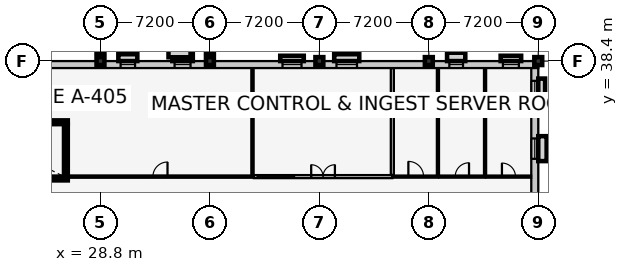
"""IFC4 building model, lengths in metres.
Left out: names, types, materials, properties, quantities, classifications, styles, units other than length and angle.
Written with IfcOpenShell. Run it as: python <this file> out.ifc"""

import sys

from ifc_helpers import new_model, si_unit, direction, frame, frame_2d, origin, origin_2d, place, context, subcontext, project, spatial, rectangle, extrude, element, fill, save


model = new_model("IFC4")
c1 = context("Model", 3, precision=1e-05, world=origin(), true_north=direction((0.0, 1.0)))
c2 = subcontext(c1, "Body", "Model", "MODEL_VIEW")
j1 = project(units=[si_unit("LENGTHUNIT", "METRE"), si_unit("PLANEANGLEUNIT", "RADIAN")], contexts=[c1])
p1 = place(None, origin())
s1 = spatial("IfcSite", under=j1, at=p1, CompositionType="ELEMENT")
p2 = place(p1, origin())
s2 = spatial("IfcBuilding", under=s1, at=p2, CompositionType="ELEMENT")
p3 = place(p2, frame((0.0, 0.0, 5.4)))
s3 = spatial("IfcBuildingStorey", under=s2, at=p3, CompositionType="ELEMENT", Elevation=5.4)
for number, where, z_axis, x_axis in (
    (1, (28.8, 38.4, 0.0), (0.0, 0.0, 1.0), (1.0, 0.0, 0.0)),
    (2, (36.0, 38.4, 0.0), (0.0, 0.0, 1.0), (1.0, 0.0, 0.0)),
    (3, (43.2, 38.4, 0.0), (0.0, 0.0, 1.0), (1.0, 0.0, 0.0)),
    (4, (50.4, 38.4, 0.0), (0.0, 0.0, 1.0), (1.0, 0.0, 0.0)),
    (5, (57.6, 38.4, 0.0), (0.0, 0.0, 1.0), (1.0, 0.0, 0.0)),
    (6, (28.8, 39.2, 0.0), (0.0, 0.0, 1.0), (1.0, 0.0, 0.0)),
    (7, (36.0, 39.2, 0.0), (0.0, 0.0, 1.0), (1.0, 0.0, 0.0)),
):
    element("IfcColumn", number, at=place(p3, frame(where, z_axis=z_axis, x_axis=x_axis)), inside=s3, PredefinedType="COLUMN", context=c2, shape_type="SweptSolid", body=[
        extrude(rectangle(XDim=0.52, YDim=0.52, at=origin_2d()), origin(), (0.0, 0.0, 1.0), 4.2),
    ])
p4 = place(p3, frame((57.37, 38.4, 0.0), z_axis=(0.0, 0.0, 1.0), x_axis=(0.0, -1.0, 0.0)))
e8 = element("IfcWall", 8, at=p4, inside=s3, PredefinedType="SOLIDWALL", context=c2, shape_type="SweptSolid", body=[
    extrude(rectangle(XDim=38.4, YDim=0.46, at=frame_2d((19.2, 0.0))), origin(), (0.0, 0.0, 1.0), 3.075),
])
p5 = place(p4, frame((1.3, 0.0, 0.9)))
e9 = element("IfcOpeningElement", 9, at=p5, cuts=e8, PredefinedType="OPENING", context=c2, shape_type="SweptSolid", body=[
    extrude(rectangle(XDim=1.24, YDim=1.75, at=frame_2d((0.62, 0.875))), frame((0.0, 0.242, 0.0), z_axis=(0.0, -1.0, 0.0), x_axis=(1.0, 0.0, 0.0)), (0.0, 0.0, 1.0), 0.484),
])
p6 = place(p4, frame((5.09, 0.0, 0.9)))
e10 = element("IfcOpeningElement", 10, at=p6, cuts=e8, PredefinedType="OPENING", context=c2, shape_type="SweptSolid", body=[
    extrude(rectangle(XDim=1.34, YDim=1.75, at=frame_2d((0.67, 0.875))), frame((0.0, 0.242, 0.0), z_axis=(0.0, -1.0, 0.0), x_axis=(1.0, 0.0, 0.0)), (0.0, 0.0, 1.0), 0.484),
])
p7 = place(p3, frame((0.0, 38.17, 0.0), z_axis=(0.0, 0.0, 1.0), x_axis=(1.0, 0.0, 0.0)))
e11 = element("IfcWall", 11, at=p7, inside=s3, PredefinedType="SOLIDWALL", context=c2, shape_type="SweptSolid", body=[
    extrude(rectangle(XDim=57.6, YDim=0.46, at=frame_2d((28.8, 0.0))), origin(), (0.0, 0.0, 1.0), 3.215),
])
p8 = place(p7, frame((1.08, 0.0, 0.9)))
e12 = element("IfcOpeningElement", 12, at=p8, cuts=e11, PredefinedType="OPENING", context=c2, shape_type="SweptSolid", body=[
    extrude(rectangle(XDim=1.44, YDim=1.75, at=frame_2d((0.72, 0.875))), frame((0.0, 0.242, 0.0), z_axis=(0.0, -1.0, 0.0), x_axis=(1.0, 0.0, 0.0)), (0.0, 0.0, 1.0), 0.484),
])
p9 = place(p7, frame((4.65, 0.0, 0.9)))
e13 = element("IfcOpeningElement", 13, at=p9, cuts=e11, PredefinedType="OPENING", context=c2, shape_type="SweptSolid", body=[
    extrude(rectangle(XDim=1.5, YDim=1.75, at=frame_2d((0.75, 0.875))), frame((0.0, 0.242, 0.0), z_axis=(0.0, -1.0, 0.0), x_axis=(1.0, 0.0, 0.0)), (0.0, 0.0, 1.0), 0.484),
])
p10 = place(p7, frame((8.55, 0.0, 0.9)))
e14 = element("IfcOpeningElement", 14, at=p10, cuts=e11, PredefinedType="OPENING", context=c2, shape_type="SweptSolid", body=[
    extrude(rectangle(XDim=0.9, YDim=1.35, at=frame_2d((0.45, 0.675))), frame((0.0, 0.242, 0.0), z_axis=(0.0, -1.0, 0.0), x_axis=(1.0, 0.0, 0.0)), (0.0, 0.0, 1.0), 0.484),
])
p11 = place(p7, frame((12.1, 0.0, 0.9)))
e15 = element("IfcOpeningElement", 15, at=p11, cuts=e11, PredefinedType="OPENING", context=c2, shape_type="SweptSolid", body=[
    extrude(rectangle(XDim=1.0, YDim=1.35, at=frame_2d((0.5, 0.675))), frame((0.0, 0.242, 0.0), z_axis=(0.0, -1.0, 0.0), x_axis=(1.0, 0.0, 0.0)), (0.0, 0.0, 1.0), 0.484),
])
p12 = place(p7, frame((15.65, 0.0, 0.9)))
e16 = element("IfcOpeningElement", 16, at=p12, cuts=e11, PredefinedType="OPENING", context=c2, shape_type="SweptSolid", body=[
    extrude(rectangle(XDim=1.1, YDim=1.35, at=frame_2d((0.55, 0.675))), frame((0.0, 0.242, 0.0), z_axis=(0.0, -1.0, 0.0), x_axis=(1.0, 0.0, 0.0)), (0.0, 0.0, 1.0), 0.484),
])
p13 = place(p7, frame((19.2, 0.0, 0.9)))
e17 = element("IfcOpeningElement", 17, at=p13, cuts=e11, PredefinedType="OPENING", context=c2, shape_type="SweptSolid", body=[
    extrude(rectangle(XDim=1.2, YDim=1.35, at=frame_2d((0.6, 0.675))), frame((0.0, 0.242, 0.0), z_axis=(0.0, -1.0, 0.0), x_axis=(1.0, 0.0, 0.0)), (0.0, 0.0, 1.0), 0.484),
])
p14 = place(p7, frame((22.75, 0.0, 0.9)))
e18 = element("IfcOpeningElement", 18, at=p14, cuts=e11, PredefinedType="OPENING", context=c2, shape_type="SweptSolid", body=[
    extrude(rectangle(XDim=1.3, YDim=1.35, at=frame_2d((0.65, 0.675))), frame((0.0, 0.242, 0.0), z_axis=(0.0, -1.0, 0.0), x_axis=(1.0, 0.0, 0.0)), (0.0, 0.0, 1.0), 0.484),
])
p15 = place(p7, frame((30.125, 0.0, 0.9)))
e19 = element("IfcOpeningElement", 19, at=p15, cuts=e11, PredefinedType="OPENING", context=c2, shape_type="SweptSolid", body=[
    extrude(rectangle(XDim=0.95, YDim=1.45, at=frame_2d((0.475, 0.725))), frame((0.0, 0.242, 0.0), z_axis=(0.0, -1.0, 0.0), x_axis=(1.0, 0.0, 0.0)), (0.0, 0.0, 1.0), 0.484),
])
p16 = place(p7, frame((33.675, 0.0, 0.9)))
e20 = element("IfcOpeningElement", 20, at=p16, cuts=e11, PredefinedType="OPENING", context=c2, shape_type="SweptSolid", body=[
    extrude(rectangle(XDim=1.05, YDim=1.45, at=frame_2d((0.525, 0.725))), frame((0.0, 0.242, 0.0), z_axis=(0.0, -1.0, 0.0), x_axis=(1.0, 0.0, 0.0)), (0.0, 0.0, 1.0), 0.484),
])
p17 = place(p7, frame((40.775, 0.0, 0.9)))
e21 = element("IfcOpeningElement", 21, at=p17, cuts=e11, PredefinedType="OPENING", context=c2, shape_type="SweptSolid", body=[
    extrude(rectangle(XDim=1.25, YDim=1.45, at=frame_2d((0.625, 0.725))), frame((0.0, 0.242, 0.0), z_axis=(0.0, -1.0, 0.0), x_axis=(1.0, 0.0, 0.0)), (0.0, 0.0, 1.0), 0.484),
])
p18 = place(p7, frame((44.325, 0.0, 0.9)))
e22 = element("IfcOpeningElement", 22, at=p18, cuts=e11, PredefinedType="OPENING", context=c2, shape_type="SweptSolid", body=[
    extrude(rectangle(XDim=1.35, YDim=1.45, at=frame_2d((0.675, 0.725))), frame((0.0, 0.242, 0.0), z_axis=(0.0, -1.0, 0.0), x_axis=(1.0, 0.0, 0.0)), (0.0, 0.0, 1.0), 0.484),
])
p19 = place(p7, frame((51.75, 0.0, 0.9)))
e23 = element("IfcOpeningElement", 23, at=p19, cuts=e11, PredefinedType="OPENING", context=c2, shape_type="SweptSolid", body=[
    extrude(rectangle(XDim=0.9, YDim=1.6, at=frame_2d((0.45, 0.8))), frame((0.0, 0.242, 0.0), z_axis=(0.0, -1.0, 0.0), x_axis=(1.0, 0.0, 0.0)), (0.0, 0.0, 1.0), 0.484),
])
p20 = place(p7, frame((55.275, 0.0, 0.9)))
e24 = element("IfcOpeningElement", 24, at=p20, cuts=e11, PredefinedType="OPENING", context=c2, shape_type="SweptSolid", body=[
    extrude(rectangle(XDim=1.05, YDim=1.6, at=frame_2d((0.525, 0.8))), frame((0.0, 0.242, 0.0), z_axis=(0.0, -1.0, 0.0), x_axis=(1.0, 0.0, 0.0)), (0.0, 0.0, 1.0), 0.484),
])
for number, where, z_axis, x_axis in (
    (25, (17.75, 30.675, 0.0), (0.0, 0.0, 1.0), (1.0, 0.0, 0.0)),
    (26, (26.65, 34.375, 0.0), (0.0, 0.0, 1.0), (-1.0, 0.0, 0.0)),
):
    element("IfcWall", number, at=place(p3, frame(where, z_axis=z_axis, x_axis=x_axis)), inside=s3, PredefinedType="SHEAR", context=c2, shape_type="SweptSolid", body=[
        extrude(rectangle(XDim=8.9, YDim=0.25, at=frame_2d((4.45, 0.0))), origin(), (0.0, 0.0, 1.0), 3.92),
    ])
p21 = place(p3, frame((26.525, 30.8, 0.0), z_axis=(0.0, 0.0, 1.0), x_axis=(0.0, 1.0, 0.0)))
e27 = element("IfcWall", 27, at=p21, inside=s3, PredefinedType="SHEAR", context=c2, shape_type="SweptSolid", body=[
    extrude(rectangle(XDim=3.45, YDim=0.25, at=frame_2d((1.725, 0.0))), origin(), (0.0, 0.0, 1.0), 3.92),
])
p22 = place(p3, frame((26.66, 30.8, 0.0), z_axis=(0.0, 0.0, 1.0), x_axis=(1.0, 0.0, 0.0)))
e28 = element("IfcWall", 28, at=p22, inside=s3, PredefinedType="PARTITIONING", context=c2, shape_type="SweptSolid", body=[
    extrude(rectangle(XDim=12.14, YDim=0.15, at=frame_2d((6.07, 0.0))), origin(), (0.0, 0.0, 1.0), 3.92),
])
p23 = place(p22, frame((5.59, 0.0, 0.0)))
e29 = element("IfcOpeningElement", 29, at=p23, cuts=e28, PredefinedType="OPENING", context=c2, shape_type="SweptSolid", body=[
    extrude(rectangle(XDim=0.96, YDim=2.1, at=frame_2d((0.48, 1.05))), frame((0.0, 0.087, 0.0), z_axis=(0.0, -1.0, 0.0), x_axis=(1.0, 0.0, 0.0)), (0.0, 0.0, 1.0), 0.174),
])
p24 = place(p3, frame((38.8, 30.885, 0.0), z_axis=(0.0, 0.0, 1.0), x_axis=(0.0, 1.0, 0.0)))
e30 = element("IfcWall", 30, at=p24, inside=s3, PredefinedType="PARTITIONING", context=c2, shape_type="SweptSolid", body=[
    extrude(rectangle(XDim=7.045, YDim=0.15, at=frame_2d((3.522, 0.0))), origin(), (0.0, 0.0, 1.0), 3.92),
])
p25 = place(p3, frame((38.885, 30.8, 0.0), z_axis=(0.0, 0.0, 1.0), x_axis=(1.0, 0.0, 0.0)))
e31 = element("IfcWall", 31, at=p25, inside=s3, PredefinedType="PARTITIONING", context=c2, shape_type="SweptSolid", body=[
    extrude(rectangle(XDim=9.115, YDim=0.2, at=frame_2d((4.558, 0.0))), origin(), (0.0, 0.0, 1.0), 3.92),
])
p26 = place(p25, frame((3.778, 0.0, 0.0)))
e32 = element("IfcOpeningElement", 32, at=p26, cuts=e31, PredefinedType="OPENING", context=c2, shape_type="SweptSolid", body=[
    extrude(rectangle(XDim=1.56, YDim=2.25, at=frame_2d((0.78, 1.125))), frame((0.0, 0.112, 0.0), z_axis=(0.0, -1.0, 0.0), x_axis=(1.0, 0.0, 0.0)), (0.0, 0.0, 1.0), 0.224),
])
p27 = place(p25, frame((0.25, 0.0, 1.0)))
e33 = element("IfcOpeningElement", 33, at=p27, cuts=e31, PredefinedType="OPENING", context=c2, shape_type="SweptSolid", body=[
    extrude(rectangle(XDim=2.4, YDim=1.25, at=frame_2d((1.2, 0.625))), frame((0.0, 0.112, 0.0), z_axis=(0.0, -1.0, 0.0), x_axis=(1.0, 0.0, 0.0)), (0.0, 0.0, 1.0), 0.224),
])
p28 = place(p3, frame((48.0, 30.91, 0.0), z_axis=(0.0, 0.0, 1.0), x_axis=(0.0, 1.0, 0.0)))
e34 = element("IfcWall", 34, at=p28, inside=s3, PredefinedType="PARTITIONING", context=c2, shape_type="SweptSolid", body=[
    extrude(rectangle(XDim=7.02, YDim=0.2, at=frame_2d((3.51, 0.0))), origin(), (0.0, 0.0, 1.0), 3.92),
])
p29 = place(p3, frame((48.11, 30.8, 0.0), z_axis=(0.0, 0.0, 1.0), x_axis=(1.0, 0.0, 0.0)))
e35 = element("IfcWall", 35, at=p29, inside=s3, PredefinedType="PARTITIONING", context=c2, shape_type="SweptSolid", body=[
    extrude(rectangle(XDim=2.89, YDim=0.14, at=frame_2d((1.445, 0.0))), origin(), (0.0, 0.0, 1.0), 3.92),
])
p30 = place(p29, frame((0.945, 0.0, 0.0)))
e36 = element("IfcOpeningElement", 36, at=p30, cuts=e35, PredefinedType="OPENING", context=c2, shape_type="SweptSolid", body=[
    extrude(rectangle(XDim=1.0, YDim=2.1, at=frame_2d((0.5, 1.05))), frame((0.0, 0.082, 0.0), z_axis=(0.0, -1.0, 0.0), x_axis=(1.0, 0.0, 0.0)), (0.0, 0.0, 1.0), 0.164),
])
p31 = place(p3, frame((51.0, 30.88, 0.0), z_axis=(0.0, 0.0, 1.0), x_axis=(0.0, 1.0, 0.0)))
e37 = element("IfcWall", 37, at=p31, inside=s3, PredefinedType="PARTITIONING", context=c2, shape_type="SweptSolid", body=[
    extrude(rectangle(XDim=7.05, YDim=0.14, at=frame_2d((3.525, 0.0))), origin(), (0.0, 0.0, 1.0), 3.92),
])
p32 = place(p3, frame((51.08, 30.8, 0.0), z_axis=(0.0, 0.0, 1.0), x_axis=(1.0, 0.0, 0.0)))
e38 = element("IfcWall", 38, at=p32, inside=s3, PredefinedType="PARTITIONING", context=c2, shape_type="SweptSolid", body=[
    extrude(rectangle(XDim=3.02, YDim=0.14, at=frame_2d((1.51, 0.0))), origin(), (0.0, 0.0, 1.0), 3.92),
])
p33 = place(p32, frame((1.055, 0.0, 0.0)))
e39 = element("IfcOpeningElement", 39, at=p33, cuts=e38, PredefinedType="OPENING", context=c2, shape_type="SweptSolid", body=[
    extrude(rectangle(XDim=0.91, YDim=2.06, at=frame_2d((0.455, 1.03))), frame((0.0, 0.082, 0.0), z_axis=(0.0, -1.0, 0.0), x_axis=(1.0, 0.0, 0.0)), (0.0, 0.0, 1.0), 0.164),
])
p34 = place(p3, frame((54.1, 30.88, 0.0), z_axis=(0.0, 0.0, 1.0), x_axis=(0.0, 1.0, 0.0)))
e40 = element("IfcWall", 40, at=p34, inside=s3, PredefinedType="PARTITIONING", context=c2, shape_type="SweptSolid", body=[
    extrude(rectangle(XDim=7.05, YDim=0.14, at=frame_2d((3.525, 0.0))), origin(), (0.0, 0.0, 1.0), 3.675),
])
p35 = place(p3, frame((54.18, 30.8, 0.0), z_axis=(0.0, 0.0, 1.0), x_axis=(1.0, 0.0, 0.0)))
e41 = element("IfcWall", 41, at=p35, inside=s3, PredefinedType="PARTITIONING", context=c2, shape_type="SweptSolid", body=[
    extrude(rectangle(XDim=2.95, YDim=0.14, at=frame_2d((1.475, 0.0))), origin(), (0.0, 0.0, 1.0), 3.92),
])
p36 = place(p35, frame((1.03, 0.0, 0.0)))
e42 = element("IfcOpeningElement", 42, at=p36, cuts=e41, PredefinedType="OPENING", context=c2, shape_type="SweptSolid", body=[
    extrude(rectangle(XDim=0.89, YDim=2.05, at=frame_2d((0.445, 1.025))), frame((0.0, 0.082, 0.0), z_axis=(0.0, -1.0, 0.0), x_axis=(1.0, 0.0, 0.0)), (0.0, 0.0, 1.0), 0.164),
])
p37 = place(p5, origin())
e43 = element("IfcWindow", 43, at=p37, inside=s3, PartitioningType="SINGLE_PANEL", PredefinedType="WINDOW", context=c2, shape_type="SweptSolid", body=[
    extrude(rectangle(XDim=1.24, YDim=1.75, at=frame_2d((0.62, 0.875))), frame((0.0, 0.03, 0.0), z_axis=(0.0, -1.0, 0.0), x_axis=(1.0, 0.0, 0.0)), (0.0, 0.0, 1.0), 0.06),
])
fill(e9, e43)
p38 = place(p6, origin())
e44 = element("IfcWindow", 44, at=p38, inside=s3, PartitioningType="SINGLE_PANEL", PredefinedType="WINDOW", context=c2, shape_type="SweptSolid", body=[
    extrude(rectangle(XDim=1.34, YDim=1.75, at=frame_2d((0.67, 0.875))), frame((0.0, 0.03, 0.0), z_axis=(0.0, -1.0, 0.0), x_axis=(1.0, 0.0, 0.0)), (0.0, 0.0, 1.0), 0.06),
])
fill(e10, e44)
p39 = place(p15, origin())
e45 = element("IfcWindow", 45, at=p39, inside=s3, PartitioningType="SINGLE_PANEL", PredefinedType="WINDOW", context=c2, shape_type="SweptSolid", body=[
    extrude(rectangle(XDim=0.95, YDim=1.45, at=frame_2d((0.475, 0.725))), frame((0.0, 0.03, 0.0), z_axis=(0.0, -1.0, 0.0), x_axis=(1.0, 0.0, 0.0)), (0.0, 0.0, 1.0), 0.06),
])
fill(e19, e45)
p40 = place(p16, origin())
e46 = element("IfcWindow", 46, at=p40, inside=s3, PartitioningType="SINGLE_PANEL", PredefinedType="WINDOW", context=c2, shape_type="SweptSolid", body=[
    extrude(rectangle(XDim=1.05, YDim=1.45, at=frame_2d((0.525, 0.725))), frame((0.0, 0.03, 0.0), z_axis=(0.0, -1.0, 0.0), x_axis=(1.0, 0.0, 0.0)), (0.0, 0.0, 1.0), 0.06),
])
fill(e20, e46)
p41 = place(p17, origin())
e47 = element("IfcWindow", 47, at=p41, inside=s3, PartitioningType="SINGLE_PANEL", PredefinedType="WINDOW", context=c2, shape_type="SweptSolid", body=[
    extrude(rectangle(XDim=1.25, YDim=1.45, at=frame_2d((0.625, 0.725))), frame((0.0, 0.03, 0.0), z_axis=(0.0, -1.0, 0.0), x_axis=(1.0, 0.0, 0.0)), (0.0, 0.0, 1.0), 0.06),
])
fill(e21, e47)
p42 = place(p18, origin())
e48 = element("IfcWindow", 48, at=p42, inside=s3, PartitioningType="SINGLE_PANEL", PredefinedType="WINDOW", context=c2, shape_type="SweptSolid", body=[
    extrude(rectangle(XDim=1.35, YDim=1.45, at=frame_2d((0.675, 0.725))), frame((0.0, 0.03, 0.0), z_axis=(0.0, -1.0, 0.0), x_axis=(1.0, 0.0, 0.0)), (0.0, 0.0, 1.0), 0.06),
])
fill(e22, e48)
p43 = place(p19, origin())
e49 = element("IfcWindow", 49, at=p43, inside=s3, PartitioningType="SINGLE_PANEL", PredefinedType="WINDOW", context=c2, shape_type="SweptSolid", body=[
    extrude(rectangle(XDim=0.9, YDim=1.6, at=frame_2d((0.45, 0.8))), frame((0.0, 0.03, 0.0), z_axis=(0.0, -1.0, 0.0), x_axis=(1.0, 0.0, 0.0)), (0.0, 0.0, 1.0), 0.06),
])
fill(e23, e49)
p44 = place(p20, origin())
e50 = element("IfcWindow", 50, at=p44, inside=s3, PartitioningType="SINGLE_PANEL", PredefinedType="WINDOW", context=c2, shape_type="SweptSolid", body=[
    extrude(rectangle(XDim=1.05, YDim=1.6, at=frame_2d((0.525, 0.8))), frame((0.0, 0.03, 0.0), z_axis=(0.0, -1.0, 0.0), x_axis=(1.0, 0.0, 0.0)), (0.0, 0.0, 1.0), 0.06),
])
fill(e24, e50)
p45 = place(p23, origin())
e51 = element("IfcDoor", 51, at=p45, inside=s3, OperationType="SINGLE_SWING_RIGHT", PredefinedType="DOOR", context=c2, shape_type="SweptSolid", body=[
    extrude(rectangle(XDim=0.96, YDim=2.1, at=frame_2d((0.48, 1.05))), frame((0.0, 0.025, 0.0), z_axis=(0.0, -1.0, 0.0), x_axis=(1.0, 0.0, 0.0)), (0.0, 0.0, 1.0), 0.05),
])
fill(e29, e51)
p46 = place(p26, origin())
e52 = element("IfcDoor", 52, at=p46, inside=s3, OperationType="DOUBLE_DOOR_SINGLE_SWING", PredefinedType="DOOR", context=c2, shape_type="SweptSolid", body=[
    extrude(rectangle(XDim=1.56, YDim=2.25, at=frame_2d((0.78, 1.125))), frame((0.0, 0.025, 0.0), z_axis=(0.0, -1.0, 0.0), x_axis=(1.0, 0.0, 0.0)), (0.0, 0.0, 1.0), 0.05),
])
fill(e32, e52)
p47 = place(p27, origin())
e53 = element("IfcWindow", 53, at=p47, inside=s3, PartitioningType="SINGLE_PANEL", PredefinedType="WINDOW", context=c2, shape_type="SweptSolid", body=[
    extrude(rectangle(XDim=2.4, YDim=1.25, at=frame_2d((1.2, 0.625))), frame((0.0, 0.03, 0.0), z_axis=(0.0, -1.0, 0.0), x_axis=(1.0, 0.0, 0.0)), (0.0, 0.0, 1.0), 0.06),
])
fill(e33, e53)
p48 = place(p30, origin())
e54 = element("IfcDoor", 54, at=p48, inside=s3, OperationType="SINGLE_SWING_LEFT", PredefinedType="DOOR", context=c2, shape_type="SweptSolid", body=[
    extrude(rectangle(XDim=1.0, YDim=2.1, at=frame_2d((0.5, 1.05))), frame((0.0, 0.025, 0.0), z_axis=(0.0, -1.0, 0.0), x_axis=(1.0, 0.0, 0.0)), (0.0, 0.0, 1.0), 0.05),
])
fill(e36, e54)
p49 = place(p33, origin())
e55 = element("IfcDoor", 55, at=p49, inside=s3, OperationType="SINGLE_SWING_RIGHT", PredefinedType="DOOR", context=c2, shape_type="SweptSolid", body=[
    extrude(rectangle(XDim=0.91, YDim=2.06, at=frame_2d((0.455, 1.03))), frame((0.0, 0.025, 0.0), z_axis=(0.0, -1.0, 0.0), x_axis=(1.0, 0.0, 0.0)), (0.0, 0.0, 1.0), 0.05),
])
fill(e39, e55)
p50 = place(p36, origin())
e56 = element("IfcDoor", 56, at=p50, inside=s3, OperationType="SINGLE_SWING_LEFT", PredefinedType="DOOR", context=c2, shape_type="SweptSolid", body=[
    extrude(rectangle(XDim=0.89, YDim=2.05, at=frame_2d((0.445, 1.025))), frame((0.0, 0.025, 0.0), z_axis=(0.0, -1.0, 0.0), x_axis=(1.0, 0.0, 0.0)), (0.0, 0.0, 1.0), 0.05),
])
fill(e42, e56)
save(model, sys.argv[1])
